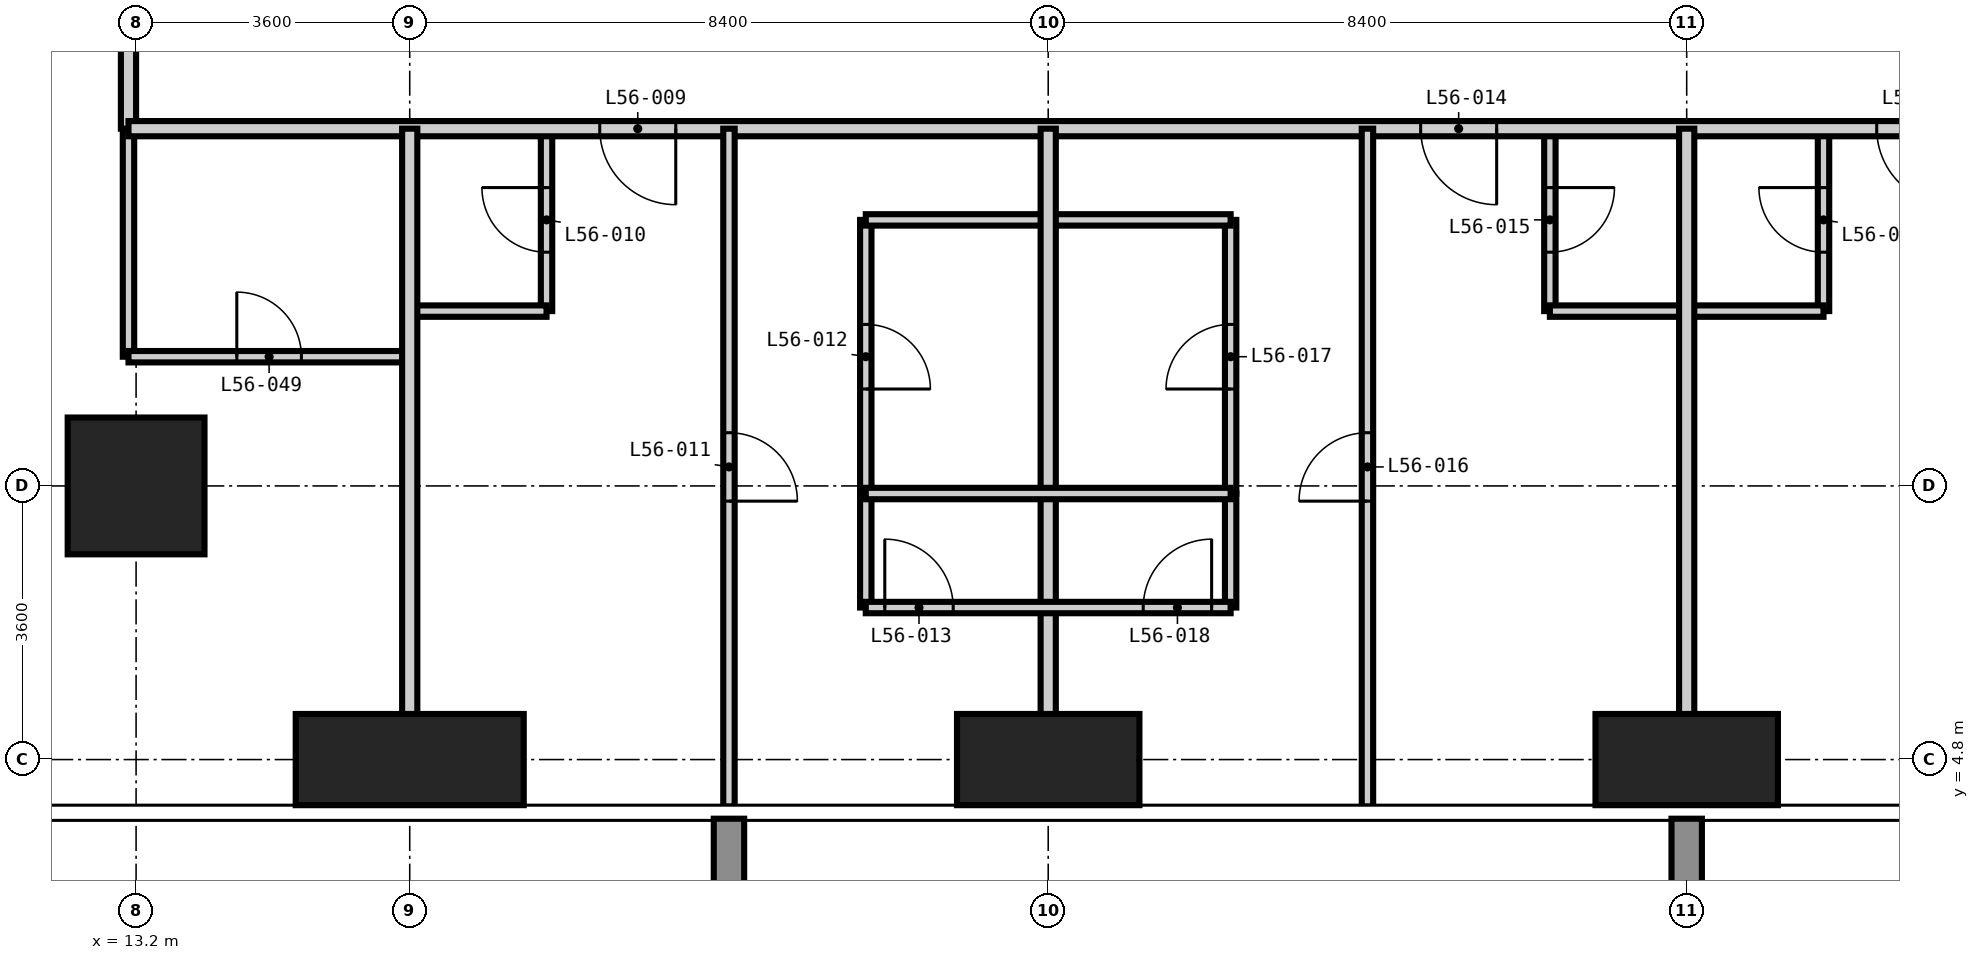
"""IFC4 building model, lengths in metres.
Left out: names, types, materials, properties, quantities, classifications, styles, units other than length and angle.
Written with IfcOpenShell. Run it as: python <this file> out.ifc"""

import sys

from ifc_helpers import new_model, si_unit, direction, frame, frame_2d, origin, origin_2d, place, context, subcontext, project, spatial, rectangle, extrude, element, fill, save


model = new_model("IFC4")
c1 = context("Model", 3, precision=1e-05, world=origin(), true_north=direction((0.0, 1.0)))
c2 = subcontext(c1, "Body", "Model", "MODEL_VIEW")
j1 = project(units=[si_unit("LENGTHUNIT", "METRE"), si_unit("PLANEANGLEUNIT", "RADIAN")], contexts=[c1])
p1 = place(None, origin())
s1 = spatial("IfcSite", under=j1, at=p1, CompositionType="ELEMENT")
p2 = place(p1, origin())
s2 = spatial("IfcBuilding", under=s1, at=p2, CompositionType="ELEMENT")
p3 = place(p2, frame((0.0, 0.0, 216.6)))
s3 = spatial("IfcBuildingStorey", under=s2, at=p3, CompositionType="ELEMENT", Elevation=216.6)
p4 = place(p3, frame((13.2, 8.4, -0.35), z_axis=(0.0, 0.0, 1.0), x_axis=(1.0, 0.0, 0.0)))
e1 = element("IfcColumn", 1, at=p4, inside=s3, PredefinedType="COLUMN", context=c2, shape_type="SweptSolid", body=[
    extrude(rectangle(XDim=1.8, YDim=1.8, at=origin_2d()), origin(), (0.0, 0.0, 1.0), 3.55),
])
p5 = place(p3, frame((16.8, 4.8, -0.35), z_axis=(0.0, 0.0, 1.0), x_axis=(1.0, 0.0, 0.0)))
e2 = element("IfcColumn", 2, at=p5, inside=s3, PredefinedType="COLUMN", context=c2, shape_type="SweptSolid", body=[
    extrude(rectangle(XDim=3.0, YDim=1.2, at=origin_2d()), origin(), (0.0, 0.0, 1.0), 3.55),
])
for number, where, z_axis, x_axis in (
    (3, (25.2, 4.8, -0.35), (0.0, 0.0, 1.0), (1.0, 0.0, 0.0)),
    (4, (33.6, 4.8, -0.35), (0.0, 0.0, 1.0), (1.0, 0.0, 0.0)),
):
    element("IfcColumn", number, at=place(p3, frame(where, z_axis=z_axis, x_axis=x_axis)), inside=s3, PredefinedType="COLUMN", context=c2, shape_type="SweptSolid", body=[
        extrude(rectangle(XDim=2.4, YDim=1.2, at=origin_2d()), origin(), (0.0, 0.0, 1.0), 3.55),
    ])
p6 = place(p3, frame((13.1, 10.1, 0.0), z_axis=(0.0, 0.0, 1.0), x_axis=(0.0, 1.0, 0.0)))
e5 = element("IfcWall", 5, at=p6, inside=s3, PredefinedType="PARTITIONING", context=c2, shape_type="SweptSolid", body=[
    extrude(rectangle(XDim=3.0, YDim=0.15, at=frame_2d((1.5, 0.0))), origin(), (0.0, 0.0, 1.0), 3.2),
])
p7 = place(p3, frame((18.6, 10.7, 0.0), z_axis=(0.0, 0.0, 1.0), x_axis=(0.0, 1.0, 0.0)))
e6 = element("IfcWall", 6, at=p7, inside=s3, PredefinedType="PARTITIONING", context=c2, shape_type="SweptSolid", body=[
    extrude(rectangle(XDim=2.4, YDim=0.15, at=frame_2d((1.2, 0.0))), origin(), (0.0, 0.0, 1.0), 3.2),
])
p8 = place(p7, frame((0.775, 0.0, 0.0)))
e7 = element("IfcOpeningElement", 7, at=p8, cuts=e6, PredefinedType="OPENING", context=c2, shape_type="SweptSolid", body=[
    extrude(rectangle(XDim=0.85, YDim=2.1, at=frame_2d((0.425, 1.05))), frame((0.0, 0.085, 0.0), z_axis=(0.0, -1.0, 0.0), x_axis=(1.0, 0.0, 0.0)), (0.0, 0.0, 1.0), 0.17),
])
p9 = place(p3, frame((22.8, 8.3, 0.0), z_axis=(0.0, 0.0, 1.0), x_axis=(0.0, 1.0, 0.0)))
e8 = element("IfcWall", 8, at=p9, inside=s3, PredefinedType="PARTITIONING", context=c2, shape_type="SweptSolid", body=[
    extrude(rectangle(XDim=3.6, YDim=0.15, at=frame_2d((1.8, 0.0))), origin(), (0.0, 0.0, 1.0), 3.2),
])
p10 = place(p9, frame((1.375, 0.0, 0.0)))
e9 = element("IfcOpeningElement", 9, at=p10, cuts=e8, PredefinedType="OPENING", context=c2, shape_type="SweptSolid", body=[
    extrude(rectangle(XDim=0.85, YDim=2.1, at=frame_2d((0.425, 1.05))), frame((0.0, 0.085, 0.0), z_axis=(0.0, -1.0, 0.0), x_axis=(1.0, 0.0, 0.0)), (0.0, 0.0, 1.0), 0.17),
])
p11 = place(p3, frame((27.6, 8.3, 0.0), z_axis=(0.0, 0.0, 1.0), x_axis=(0.0, 1.0, 0.0)))
e10 = element("IfcWall", 10, at=p11, inside=s3, PredefinedType="PARTITIONING", context=c2, shape_type="SweptSolid", body=[
    extrude(rectangle(XDim=3.6, YDim=0.15, at=frame_2d((1.8, 0.0))), origin(), (0.0, 0.0, 1.0), 3.2),
])
p12 = place(p11, frame((1.375, 0.0, 0.0)))
e11 = element("IfcOpeningElement", 11, at=p12, cuts=e10, PredefinedType="OPENING", context=c2, shape_type="SweptSolid", body=[
    extrude(rectangle(XDim=0.85, YDim=2.1, at=frame_2d((0.425, 1.05))), frame((0.0, 0.085, 0.0), z_axis=(0.0, -1.0, 0.0), x_axis=(1.0, 0.0, 0.0)), (0.0, 0.0, 1.0), 0.17),
])
p13 = place(p3, frame((31.8, 10.7, 0.0), z_axis=(0.0, 0.0, 1.0), x_axis=(0.0, 1.0, 0.0)))
e12 = element("IfcWall", 12, at=p13, inside=s3, PredefinedType="PARTITIONING", context=c2, shape_type="SweptSolid", body=[
    extrude(rectangle(XDim=2.4, YDim=0.15, at=frame_2d((1.2, 0.0))), origin(), (0.0, 0.0, 1.0), 3.2),
])
p14 = place(p13, frame((0.775, 0.0, 0.0)))
e13 = element("IfcOpeningElement", 13, at=p14, cuts=e12, PredefinedType="OPENING", context=c2, shape_type="SweptSolid", body=[
    extrude(rectangle(XDim=0.85, YDim=2.1, at=frame_2d((0.425, 1.05))), frame((0.0, 0.085, 0.0), z_axis=(0.0, -1.0, 0.0), x_axis=(1.0, 0.0, 0.0)), (0.0, 0.0, 1.0), 0.17),
])
p15 = place(p3, frame((35.4, 10.7, 0.0), z_axis=(0.0, 0.0, 1.0), x_axis=(0.0, 1.0, 0.0)))
e14 = element("IfcWall", 14, at=p15, inside=s3, PredefinedType="PARTITIONING", context=c2, shape_type="SweptSolid", body=[
    extrude(rectangle(XDim=2.4, YDim=0.15, at=frame_2d((1.2, 0.0))), origin(), (0.0, 0.0, 1.0), 3.2),
])
p16 = place(p15, frame((0.775, 0.0, 0.0)))
e15 = element("IfcOpeningElement", 15, at=p16, cuts=e14, PredefinedType="OPENING", context=c2, shape_type="SweptSolid", body=[
    extrude(rectangle(XDim=0.85, YDim=2.1, at=frame_2d((0.425, 1.05))), frame((0.0, 0.085, 0.0), z_axis=(0.0, -1.0, 0.0), x_axis=(1.0, 0.0, 0.0)), (0.0, 0.0, 1.0), 0.17),
])
p17 = place(p3, frame((13.1, 10.1, 0.0), z_axis=(0.0, 0.0, 1.0), x_axis=(1.0, 0.0, 0.0)))
e16 = element("IfcWall", 16, at=p17, inside=s3, PredefinedType="PARTITIONING", context=c2, shape_type="SweptSolid", body=[
    extrude(rectangle(XDim=3.7, YDim=0.15, at=frame_2d((1.85, 0.0))), origin(), (0.0, 0.0, 1.0), 3.2),
])
p18 = place(p17, frame((1.425, 0.0, 0.0)))
e17 = element("IfcOpeningElement", 17, at=p18, cuts=e16, PredefinedType="OPENING", context=c2, shape_type="SweptSolid", body=[
    extrude(rectangle(XDim=0.85, YDim=2.1, at=frame_2d((0.425, 1.05))), frame((0.0, 0.085, 0.0), z_axis=(0.0, -1.0, 0.0), x_axis=(1.0, 0.0, 0.0)), (0.0, 0.0, 1.0), 0.17),
])
p19 = place(p3, frame((16.8, 10.7, 0.0), z_axis=(0.0, 0.0, 1.0), x_axis=(1.0, 0.0, 0.0)))
e18 = element("IfcWall", 18, at=p19, inside=s3, PredefinedType="PARTITIONING", context=c2, shape_type="SweptSolid", body=[
    extrude(rectangle(XDim=1.8, YDim=0.15, at=frame_2d((0.9, 0.0))), origin(), (0.0, 0.0, 1.0), 3.2),
])
p20 = place(p3, frame((31.8, 10.7, 0.0), z_axis=(0.0, 0.0, 1.0), x_axis=(1.0, 0.0, 0.0)))
e19 = element("IfcWall", 19, at=p20, inside=s3, PredefinedType="PARTITIONING", context=c2, shape_type="SweptSolid", body=[
    extrude(rectangle(XDim=3.6, YDim=0.15, at=frame_2d((1.8, 0.0))), origin(), (0.0, 0.0, 1.0), 3.2),
])
p21 = place(p3, frame((22.8, 11.9, 0.0), z_axis=(0.0, 0.0, 1.0), x_axis=(1.0, 0.0, 0.0)))
e20 = element("IfcWall", 20, at=p21, inside=s3, PredefinedType="PARTITIONING", context=c2, shape_type="SweptSolid", body=[
    extrude(rectangle(XDim=4.8, YDim=0.15, at=frame_2d((2.4, 0.0))), origin(), (0.0, 0.0, 1.0), 3.2),
])
p22 = place(p3, frame((13.1, 13.1, 0.0), z_axis=(0.0, 0.0, 1.0), x_axis=(0.0, 1.0, 0.0)))
e21 = element("IfcWall", 21, at=p22, inside=s3, PredefinedType="PARTITIONING", context=c2, shape_type="SweptSolid", body=[
    extrude(rectangle(XDim=32.0, YDim=0.2, at=frame_2d((16.0, 0.0))), origin(), (0.0, 0.0, 1.0), 3.2),
])
p23 = place(p22, frame((5.3, 0.0, 0.0)))
e22 = element("IfcOpeningElement", 22, at=p23, cuts=e21, PredefinedType="OPENING", context=c2, shape_type="SweptSolid", body=[
    extrude(rectangle(XDim=1.0, YDim=2.2, at=frame_2d((0.5, 1.1))), frame((0.0, 0.11, 0.0), z_axis=(0.0, -1.0, 0.0), x_axis=(1.0, 0.0, 0.0)), (0.0, 0.0, 1.0), 0.22),
])
p24 = place(p22, frame((13.1, 0.0, 0.0)))
e23 = element("IfcOpeningElement", 23, at=p24, cuts=e21, PredefinedType="OPENING", context=c2, shape_type="SweptSolid", body=[
    extrude(rectangle(XDim=1.0, YDim=2.2, at=frame_2d((0.5, 1.1))), frame((0.0, 0.11, 0.0), z_axis=(0.0, -1.0, 0.0), x_axis=(1.0, 0.0, 0.0)), (0.0, 0.0, 1.0), 0.22),
])
p25 = place(p22, frame((18.5, 0.0, 0.0)))
e24 = element("IfcOpeningElement", 24, at=p25, cuts=e21, PredefinedType="OPENING", context=c2, shape_type="SweptSolid", body=[
    extrude(rectangle(XDim=1.0, YDim=2.2, at=frame_2d((0.5, 1.1))), frame((0.0, 0.11, 0.0), z_axis=(0.0, -1.0, 0.0), x_axis=(1.0, 0.0, 0.0)), (0.0, 0.0, 1.0), 0.22),
])
p26 = place(p22, frame((26.3, 0.0, 0.0)))
e25 = element("IfcOpeningElement", 25, at=p26, cuts=e21, PredefinedType="OPENING", context=c2, shape_type="SweptSolid", body=[
    extrude(rectangle(XDim=1.0, YDim=2.2, at=frame_2d((0.5, 1.1))), frame((0.0, 0.11, 0.0), z_axis=(0.0, -1.0, 0.0), x_axis=(1.0, 0.0, 0.0)), (0.0, 0.0, 1.0), 0.22),
])
p27 = place(p22, frame((1.35, 0.0, 0.0)))
e26 = element("IfcOpeningElement", 26, at=p27, cuts=e21, PredefinedType="OPENING", context=c2, shape_type="SweptSolid", body=[
    extrude(rectangle(XDim=1.0, YDim=2.2, at=frame_2d((0.5, 1.1))), frame((0.0, 0.11, 0.0), z_axis=(0.0, -1.0, 0.0), x_axis=(1.0, 0.0, 0.0)), (0.0, 0.0, 1.0), 0.22),
])
p28 = place(p22, frame((29.95, 0.0, 0.0)))
e27 = element("IfcOpeningElement", 27, at=p28, cuts=e21, PredefinedType="OPENING", context=c2, shape_type="SweptSolid", body=[
    extrude(rectangle(XDim=1.0, YDim=2.2, at=frame_2d((0.5, 1.1))), frame((0.0, 0.11, 0.0), z_axis=(0.0, -1.0, 0.0), x_axis=(1.0, 0.0, 0.0)), (0.0, 0.0, 1.0), 0.22),
])
p29 = place(p3, frame((44.5, 13.1, 0.0), z_axis=(0.0, 0.0, 1.0), x_axis=(-1.0, 0.0, 0.0)))
e28 = element("IfcWall", 28, at=p29, inside=s3, PredefinedType="PARTITIONING", context=c2, shape_type="SweptSolid", body=[
    extrude(rectangle(XDim=31.4, YDim=0.2, at=frame_2d((15.7, 0.0))), origin(), (0.0, 0.0, 1.0), 3.2),
])
p30 = place(p29, frame((24.2, 0.0, 0.0)))
e29 = element("IfcOpeningElement", 29, at=p30, cuts=e28, PredefinedType="OPENING", context=c2, shape_type="SweptSolid", body=[
    extrude(rectangle(XDim=1.0, YDim=2.2, at=frame_2d((0.5, 1.1))), frame((0.0, 0.11, 0.0), z_axis=(0.0, -1.0, 0.0), x_axis=(1.0, 0.0, 0.0)), (0.0, 0.0, 1.0), 0.22),
])
p31 = place(p29, frame((13.4, 0.0, 0.0)))
e30 = element("IfcOpeningElement", 30, at=p31, cuts=e28, PredefinedType="OPENING", context=c2, shape_type="SweptSolid", body=[
    extrude(rectangle(XDim=1.0, YDim=2.2, at=frame_2d((0.5, 1.1))), frame((0.0, 0.11, 0.0), z_axis=(0.0, -1.0, 0.0), x_axis=(1.0, 0.0, 0.0)), (0.0, 0.0, 1.0), 0.22),
])
p32 = place(p29, frame((7.4, 0.0, 0.0)))
e31 = element("IfcOpeningElement", 31, at=p32, cuts=e28, PredefinedType="OPENING", context=c2, shape_type="SweptSolid", body=[
    extrude(rectangle(XDim=1.0, YDim=2.2, at=frame_2d((0.5, 1.1))), frame((0.0, 0.11, 0.0), z_axis=(0.0, -1.0, 0.0), x_axis=(1.0, 0.0, 0.0)), (0.0, 0.0, 1.0), 0.22),
])
for number, where, z_axis, x_axis in (
    (32, (16.8, 4.182, 0.0), (0.0, 0.0, 1.0), (0.0, 1.0, 0.0)),
    (33, (25.2, 4.182, 0.0), (0.0, 0.0, 1.0), (0.0, 1.0, 0.0)),
    (34, (33.6, 4.182, 0.0), (0.0, 0.0, 1.0), (0.0, 1.0, 0.0)),
):
    element("IfcWall", number, at=place(p3, frame(where, z_axis=z_axis, x_axis=x_axis)), inside=s3, PredefinedType="PARTITIONING", context=c2, shape_type="SweptSolid", body=[
        extrude(rectangle(XDim=8.918, YDim=0.2, at=frame_2d((4.459, 0.0))), origin(), (0.0, 0.0, 1.0), 3.2),
    ])
p33 = place(p3, frame((21.0, 4.182, 0.0), z_axis=(0.0, 0.0, 1.0), x_axis=(0.0, 1.0, 0.0)))
e35 = element("IfcWall", 35, at=p33, inside=s3, PredefinedType="PARTITIONING", context=c2, shape_type="SweptSolid", body=[
    extrude(rectangle(XDim=8.918, YDim=0.15, at=frame_2d((4.459, 0.0))), origin(), (0.0, 0.0, 1.0), 3.2),
])
p34 = place(p33, frame((4.018, 0.0, 0.0)))
e36 = element("IfcOpeningElement", 36, at=p34, cuts=e35, PredefinedType="OPENING", context=c2, shape_type="SweptSolid", body=[
    extrude(rectangle(XDim=0.9, YDim=2.1, at=frame_2d((0.45, 1.05))), frame((0.0, 0.085, 0.0), z_axis=(0.0, -1.0, 0.0), x_axis=(1.0, 0.0, 0.0)), (0.0, 0.0, 1.0), 0.17),
])
for number, where, z_axis, x_axis in (
    (37, (22.8, 6.8, 0.0), (0.0, 0.0, 1.0), (0.0, 1.0, 0.0)),
    (38, (27.6, 6.8, 0.0), (0.0, 0.0, 1.0), (0.0, 1.0, 0.0)),
):
    element("IfcWall", number, at=place(p3, frame(where, z_axis=z_axis, x_axis=x_axis)), inside=s3, PredefinedType="PARTITIONING", context=c2, shape_type="SweptSolid", body=[
        extrude(rectangle(XDim=1.5, YDim=0.15, at=frame_2d((0.75, 0.0))), origin(), (0.0, 0.0, 1.0), 3.2),
    ])
p35 = place(p3, frame((29.4, 4.182, 0.0), z_axis=(0.0, 0.0, 1.0), x_axis=(0.0, 1.0, 0.0)))
e39 = element("IfcWall", 39, at=p35, inside=s3, PredefinedType="PARTITIONING", context=c2, shape_type="SweptSolid", body=[
    extrude(rectangle(XDim=8.918, YDim=0.15, at=frame_2d((4.459, 0.0))), origin(), (0.0, 0.0, 1.0), 3.2),
])
p36 = place(p35, frame((4.018, 0.0, 0.0)))
e40 = element("IfcOpeningElement", 40, at=p36, cuts=e39, PredefinedType="OPENING", context=c2, shape_type="SweptSolid", body=[
    extrude(rectangle(XDim=0.9, YDim=2.1, at=frame_2d((0.45, 1.05))), frame((0.0, 0.085, 0.0), z_axis=(0.0, -1.0, 0.0), x_axis=(1.0, 0.0, 0.0)), (0.0, 0.0, 1.0), 0.17),
])
p37 = place(p3, frame((22.8, 6.8, 0.0), z_axis=(0.0, 0.0, 1.0), x_axis=(1.0, 0.0, 0.0)))
e41 = element("IfcWall", 41, at=p37, inside=s3, PredefinedType="PARTITIONING", context=c2, shape_type="SweptSolid", body=[
    extrude(rectangle(XDim=4.8, YDim=0.15, at=frame_2d((2.4, 0.0))), origin(), (0.0, 0.0, 1.0), 3.2),
])
p38 = place(p37, frame((0.25, 0.0, 0.0)))
e42 = element("IfcOpeningElement", 42, at=p38, cuts=e41, PredefinedType="OPENING", context=c2, shape_type="SweptSolid", body=[
    extrude(rectangle(XDim=0.9, YDim=2.1, at=frame_2d((0.45, 1.05))), frame((0.0, 0.085, 0.0), z_axis=(0.0, -1.0, 0.0), x_axis=(1.0, 0.0, 0.0)), (0.0, 0.0, 1.0), 0.17),
])
p39 = place(p37, frame((3.65, 0.0, 0.0)))
e43 = element("IfcOpeningElement", 43, at=p39, cuts=e41, PredefinedType="OPENING", context=c2, shape_type="SweptSolid", body=[
    extrude(rectangle(XDim=0.9, YDim=2.1, at=frame_2d((0.45, 1.05))), frame((0.0, 0.085, 0.0), z_axis=(0.0, -1.0, 0.0), x_axis=(1.0, 0.0, 0.0)), (0.0, 0.0, 1.0), 0.17),
])
p40 = place(p3, frame((22.8, 8.3, 0.0), z_axis=(0.0, 0.0, 1.0), x_axis=(1.0, 0.0, 0.0)))
e44 = element("IfcWall", 44, at=p40, inside=s3, PredefinedType="PARTITIONING", context=c2, shape_type="SweptSolid", body=[
    extrude(rectangle(XDim=4.8, YDim=0.15, at=frame_2d((2.4, 0.0))), origin(), (0.0, 0.0, 1.0), 3.2),
])
p41 = place(p30, origin())
e45 = element("IfcDoor", 45, at=p41, inside=s3, OperationType="SINGLE_SWING_LEFT", PredefinedType="DOOR", context=c2, shape_type="SweptSolid", body=[
    extrude(rectangle(XDim=1.0, YDim=2.2, at=frame_2d((0.5, 1.1))), frame((0.0, 0.025, 0.0), z_axis=(0.0, -1.0, 0.0), x_axis=(1.0, 0.0, 0.0)), (0.0, 0.0, 1.0), 0.05),
])
fill(e29, e45)
p42 = place(p8, origin())
e46 = element("IfcDoor", 46, at=p42, inside=s3, OperationType="SINGLE_SWING_RIGHT", PredefinedType="DOOR", context=c2, shape_type="SweptSolid", body=[
    extrude(rectangle(XDim=0.85, YDim=2.1, at=frame_2d((0.425, 1.05))), frame((0.0, 0.025, 0.0), z_axis=(0.0, -1.0, 0.0), x_axis=(1.0, 0.0, 0.0)), (0.0, 0.0, 1.0), 0.05),
])
fill(e7, e46)
p43 = place(p34, frame((0.9, 0.0, 0.0), z_axis=(0.0, 0.0, 1.0), x_axis=(-1.0, 0.0, 0.0)))
e47 = element("IfcDoor", 47, at=p43, inside=s3, OperationType="SINGLE_SWING_RIGHT", PredefinedType="DOOR", context=c2, shape_type="SweptSolid", body=[
    extrude(rectangle(XDim=0.9, YDim=2.1, at=frame_2d((0.45, 1.05))), frame((0.0, 0.025, 0.0), z_axis=(0.0, -1.0, 0.0), x_axis=(1.0, 0.0, 0.0)), (0.0, 0.0, 1.0), 0.05),
])
fill(e36, e47)
p44 = place(p10, frame((0.85, 0.0, 0.0), z_axis=(0.0, 0.0, 1.0), x_axis=(-1.0, 0.0, 0.0)))
e48 = element("IfcDoor", 48, at=p44, inside=s3, OperationType="SINGLE_SWING_RIGHT", PredefinedType="DOOR", context=c2, shape_type="SweptSolid", body=[
    extrude(rectangle(XDim=0.85, YDim=2.1, at=frame_2d((0.425, 1.05))), frame((0.0, 0.025, 0.0), z_axis=(0.0, -1.0, 0.0), x_axis=(1.0, 0.0, 0.0)), (0.0, 0.0, 1.0), 0.05),
])
fill(e9, e48)
p45 = place(p38, origin())
e49 = element("IfcDoor", 49, at=p45, inside=s3, OperationType="SINGLE_SWING_LEFT", PredefinedType="DOOR", context=c2, shape_type="SweptSolid", body=[
    extrude(rectangle(XDim=0.9, YDim=2.1, at=frame_2d((0.45, 1.05))), frame((0.0, 0.025, 0.0), z_axis=(0.0, -1.0, 0.0), x_axis=(1.0, 0.0, 0.0)), (0.0, 0.0, 1.0), 0.05),
])
fill(e42, e49)
p46 = place(p31, origin())
e50 = element("IfcDoor", 50, at=p46, inside=s3, OperationType="SINGLE_SWING_LEFT", PredefinedType="DOOR", context=c2, shape_type="SweptSolid", body=[
    extrude(rectangle(XDim=1.0, YDim=2.2, at=frame_2d((0.5, 1.1))), frame((0.0, 0.025, 0.0), z_axis=(0.0, -1.0, 0.0), x_axis=(1.0, 0.0, 0.0)), (0.0, 0.0, 1.0), 0.05),
])
fill(e30, e50)
p47 = place(p14, frame((0.85, 0.0, 0.0), z_axis=(0.0, 0.0, 1.0), x_axis=(-1.0, 0.0, 0.0)))
e51 = element("IfcDoor", 51, at=p47, inside=s3, OperationType="SINGLE_SWING_LEFT", PredefinedType="DOOR", context=c2, shape_type="SweptSolid", body=[
    extrude(rectangle(XDim=0.85, YDim=2.1, at=frame_2d((0.425, 1.05))), frame((0.0, 0.025, 0.0), z_axis=(0.0, -1.0, 0.0), x_axis=(1.0, 0.0, 0.0)), (0.0, 0.0, 1.0), 0.05),
])
fill(e13, e51)
p48 = place(p36, origin())
e52 = element("IfcDoor", 52, at=p48, inside=s3, OperationType="SINGLE_SWING_LEFT", PredefinedType="DOOR", context=c2, shape_type="SweptSolid", body=[
    extrude(rectangle(XDim=0.9, YDim=2.1, at=frame_2d((0.45, 1.05))), frame((0.0, 0.025, 0.0), z_axis=(0.0, -1.0, 0.0), x_axis=(1.0, 0.0, 0.0)), (0.0, 0.0, 1.0), 0.05),
])
fill(e40, e52)
p49 = place(p12, origin())
e53 = element("IfcDoor", 53, at=p49, inside=s3, OperationType="SINGLE_SWING_LEFT", PredefinedType="DOOR", context=c2, shape_type="SweptSolid", body=[
    extrude(rectangle(XDim=0.85, YDim=2.1, at=frame_2d((0.425, 1.05))), frame((0.0, 0.025, 0.0), z_axis=(0.0, -1.0, 0.0), x_axis=(1.0, 0.0, 0.0)), (0.0, 0.0, 1.0), 0.05),
])
fill(e11, e53)
p50 = place(p39, origin())
e54 = element("IfcDoor", 54, at=p50, inside=s3, OperationType="SINGLE_SWING_RIGHT", PredefinedType="DOOR", context=c2, shape_type="SweptSolid", body=[
    extrude(rectangle(XDim=0.9, YDim=2.1, at=frame_2d((0.45, 1.05))), frame((0.0, 0.025, 0.0), z_axis=(0.0, -1.0, 0.0), x_axis=(1.0, 0.0, 0.0)), (0.0, 0.0, 1.0), 0.05),
])
fill(e43, e54)
p51 = place(p32, origin())
e55 = element("IfcDoor", 55, at=p51, inside=s3, OperationType="SINGLE_SWING_LEFT", PredefinedType="DOOR", context=c2, shape_type="SweptSolid", body=[
    extrude(rectangle(XDim=1.0, YDim=2.2, at=frame_2d((0.5, 1.1))), frame((0.0, 0.025, 0.0), z_axis=(0.0, -1.0, 0.0), x_axis=(1.0, 0.0, 0.0)), (0.0, 0.0, 1.0), 0.05),
])
fill(e31, e55)
p52 = place(p16, origin())
e56 = element("IfcDoor", 56, at=p52, inside=s3, OperationType="SINGLE_SWING_RIGHT", PredefinedType="DOOR", context=c2, shape_type="SweptSolid", body=[
    extrude(rectangle(XDim=0.85, YDim=2.1, at=frame_2d((0.425, 1.05))), frame((0.0, 0.025, 0.0), z_axis=(0.0, -1.0, 0.0), x_axis=(1.0, 0.0, 0.0)), (0.0, 0.0, 1.0), 0.05),
])
fill(e15, e56)
p53 = place(p18, origin())
e57 = element("IfcDoor", 57, at=p53, inside=s3, OperationType="SINGLE_SWING_LEFT", PredefinedType="DOOR", context=c2, shape_type="SweptSolid", body=[
    extrude(rectangle(XDim=0.85, YDim=2.1, at=frame_2d((0.425, 1.05))), frame((0.0, 0.025, 0.0), z_axis=(0.0, -1.0, 0.0), x_axis=(1.0, 0.0, 0.0)), (0.0, 0.0, 1.0), 0.05),
])
fill(e17, e57)
save(model, sys.argv[1])
